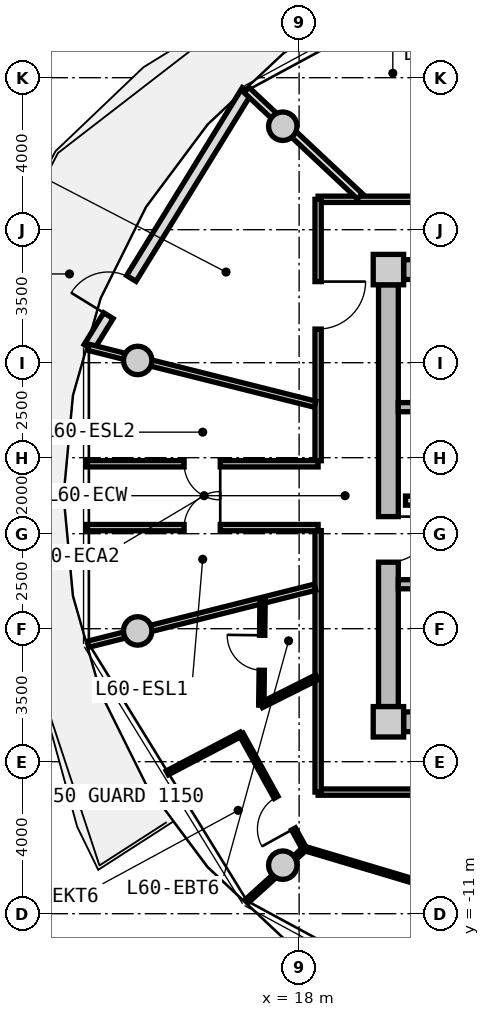
"""IFC4 building model, lengths in metres.
Left out: names, types, materials, properties, quantities, classifications, styles, units other than length and angle.
Written with IfcOpenShell. Run it as: python <this file> out.ifc"""

import sys

from ifc_helpers import new_model, si_unit, direction, frame, frame_2d, origin, origin_2d, place, context, subcontext, project, spatial, rectangle, circle, extrude, source, transform, mapped, element, fill, save


model = new_model("IFC4")
c1 = context("Model", 3, precision=1e-05, world=origin(), true_north=direction((0.0, 1.0)))
c2 = subcontext(c1, "Body", "Model", "MODEL_VIEW")
j1 = project(units=[si_unit("LENGTHUNIT", "METRE"), si_unit("PLANEANGLEUNIT", "RADIAN")], contexts=[c1])
p1 = place(None, origin())
s1 = spatial("IfcSite", under=j1, at=p1, CompositionType="ELEMENT")
p2 = place(p1, origin())
s2 = spatial("IfcBuilding", under=s1, at=p2, CompositionType="ELEMENT")
p3 = place(p2, frame((0.0, 0.0, 193.7)))
s3 = spatial("IfcBuildingStorey", under=s2, at=p3, CompositionType="ELEMENT", Elevation=193.7)
m1 = source(origin(), c2, "Body", "SweptSolid", [
    extrude(rectangle(XDim=0.8, YDim=0.8, at=origin_2d()), origin(), (0.0, 0.0, 1.0), 3.05),
])
for number, where, z_axis, x_axis in (
    (1, (20.35, -5.95, 0.0), (0.0, 0.0, 1.0), (1.0, 0.0, 0.0)),
    (2, (20.35, 5.95, 0.0), (0.0, 0.0, 1.0), (1.0, 0.0, 0.0)),
):
    element("IfcColumn", number, at=place(p3, frame(where, z_axis=z_axis, x_axis=x_axis)), inside=s3, PredefinedType="COLUMN", context=c2, shape_type="MappedRepresentation", body=[
        mapped(m1, transform((0.0, 0.0, 0.0), x_axis=(1.0, 0.0, 0.0), y_axis=(0.0, 1.0, 0.0), z_axis=(0.0, 0.0, 1.0), scale=1.0)),
    ])
m2 = source(origin(), c2, "Body", "SweptSolid", [
    extrude(rectangle(XDim=14.5, YDim=0.52, at=frame_2d((7.25, 0.0))), origin(), (0.0, 0.0, 1.0), 2.81),
])
for number, where, z_axis, x_axis in (
    (3, (20.75, 5.95, 0.0), (0.0, 0.0, 1.0), (1.0, 0.0, 0.0)),
    (4, (35.25, -5.95, 0.0), (0.0, 0.0, 1.0), (-1.0, 0.0, 0.0)),
):
    element("IfcWall", number, at=place(p3, frame(where, z_axis=z_axis, x_axis=x_axis)), inside=s3, PredefinedType="SHEAR", context=c2, shape_type="MappedRepresentation", body=[
        mapped(m2, transform((0.0, 0.0, 0.0), x_axis=(1.0, 0.0, 0.0), y_axis=(0.0, 1.0, 0.0), z_axis=(0.0, 0.0, 1.0), scale=1.0)),
    ])
m3 = source(origin(), c2, "Body", "SweptSolid", [
    extrude(rectangle(XDim=11.1, YDim=0.52, at=frame_2d((5.55, 0.0))), origin(), (0.0, 0.0, 1.0), 2.81),
])
p4 = place(p3, frame((20.35, -5.55, 0.0), z_axis=(0.0, 0.0, 1.0), x_axis=(0.0, 1.0, 0.0)))
e5 = element("IfcWall", 5, at=p4, inside=s3, PredefinedType="SHEAR", context=c2, shape_type="MappedRepresentation", body=[
    mapped(m3, transform((0.0, 0.0, 0.0), x_axis=(1.0, 0.0, 0.0), y_axis=(0.0, 1.0, 0.0), z_axis=(0.0, 0.0, 1.0), scale=1.0)),
])
p5 = place(p4, frame((3.8, 0.0, 0.0)))
e6 = element("IfcOpeningElement", 6, at=p5, cuts=e5, PredefinedType="OPENING", context=c2, shape_type="SweptSolid", body=[
    extrude(rectangle(XDim=1.2, YDim=2.15, at=frame_2d((0.6, 1.075))), frame((0.0, 0.27, 0.0), z_axis=(0.0, -1.0, 0.0), x_axis=(1.0, 0.0, 0.0)), (0.0, 0.0, 1.0), 0.54),
])
m4 = source(origin(), c2, "Body", "SweptSolid", [
    extrude(circle(Radius=0.375, at=origin_2d()), origin(), (0.0, 0.0, 1.0), 3.05),
])
for number, where, z_axis, x_axis in (
    (7, (17.57, 9.723, 0.0), (0.0, 0.0, 1.0), (1.0, 0.0, 0.0)),
    (8, (13.753, 3.559, 0.0), (0.0, 0.0, 1.0), (1.0, 0.0, 0.0)),
    (9, (13.753, -3.559, 0.0), (0.0, 0.0, 1.0), (1.0, 0.0, 0.0)),
    (10, (17.57, -9.723, 0.0), (0.0, 0.0, 1.0), (1.0, 0.0, 0.0)),
):
    element("IfcColumn", number, at=place(p3, frame(where, z_axis=z_axis, x_axis=x_axis)), inside=s3, PredefinedType="COLUMN", context=c2, shape_type="MappedRepresentation", body=[
        mapped(m4, transform((0.0, 0.0, 0.0), x_axis=(1.0, 0.0, 0.0), y_axis=(0.0, 1.0, 0.0), z_axis=(0.0, 0.0, 1.0), scale=1.0)),
    ])
m5 = source(origin(), c2, "Body", "SweptSolid", [
    extrude(rectangle(XDim=7.938, YDim=0.29, at=frame_2d((3.969, 0.0))), origin(), (0.0, 0.0, 1.0), 2.81),
])
p6 = place(p3, frame((12.468, 3.903, 0.0), z_axis=(0.0, 0.0, 1.0), x_axis=(0.524244987663, 0.851567491694, 0.0)))
e11 = element("IfcWall", 11, at=p6, inside=s3, PredefinedType="SOLIDWALL", context=c2, shape_type="MappedRepresentation", body=[
    mapped(m5, transform((0.0, 0.0, 0.0), x_axis=(1.0, 0.0, 0.0), y_axis=(0.0, 1.0, 0.0), z_axis=(0.0, 0.0, 1.0), scale=1.0)),
])
p7 = place(p6, frame((0.98, 0.0, 0.0)))
e12 = element("IfcOpeningElement", 12, at=p7, cuts=e11, PredefinedType="OPENING", context=c2, shape_type="SweptSolid", body=[
    extrude(rectangle(XDim=1.15, YDim=2.25, at=frame_2d((0.575, 1.125))), frame((0.0, 0.155, 0.0), z_axis=(0.0, -1.0, 0.0), x_axis=(1.0, 0.0, 0.0)), (0.0, 0.0, 1.0), 0.31),
])
m6 = source(origin(), c2, "Body", "SweptSolid", [
    extrude(rectangle(XDim=7.93, YDim=0.24, at=frame_2d((3.965, 0.0))), origin(), (0.0, 0.0, 1.0), 2.81),
])
p8 = place(p3, frame((20.61, 2.33, 0.0), z_axis=(0.0, 0.0, 1.0), x_axis=(1.0, 0.0, 0.0)))
e13 = element("IfcWall", 13, at=p8, inside=s3, PredefinedType="PARTITIONING", context=c2, shape_type="MappedRepresentation", body=[
    mapped(m6, transform((0.0, 0.0, 0.0), x_axis=(1.0, 0.0, 0.0), y_axis=(0.0, 1.0, 0.0), z_axis=(0.0, 0.0, 1.0), scale=1.0)),
])
p9 = place(p3, frame((20.61, -2.33, 0.0), z_axis=(0.0, 0.0, 1.0), x_axis=(1.0, 0.0, 0.0)))
e14 = element("IfcWall", 14, at=p9, inside=s3, PredefinedType="PARTITIONING", context=c2, shape_type="MappedRepresentation", body=[
    mapped(m6, transform((0.0, 0.0, 0.0), x_axis=(1.0, 0.0, 0.0), y_axis=(0.0, 1.0, 0.0), z_axis=(0.0, 0.0, 1.0), scale=1.0)),
])
p10 = place(p9, frame((1.05, 0.0, 0.0)))
e15 = element("IfcOpeningElement", 15, at=p10, cuts=e14, PredefinedType="OPENING", context=c2, shape_type="SweptSolid", body=[
    extrude(rectangle(XDim=1.1, YDim=2.15, at=frame_2d((0.55, 1.075))), frame((0.0, 0.13, 0.0), z_axis=(0.0, -1.0, 0.0), x_axis=(1.0, 0.0, 0.0)), (0.0, 0.0, 1.0), 0.26),
])
m7 = source(origin(), c2, "Body", "SweptSolid", [
    extrude(rectangle(XDim=7.62, YDim=0.24, at=frame_2d((3.81, 0.0))), origin(), (0.0, 0.0, 1.0), 2.795),
])
p11 = place(p3, frame((20.8, -0.13, 0.0), z_axis=(0.0, 0.0, 1.0), x_axis=(1.0, 0.0, 0.0)))
e16 = element("IfcWall", 16, at=p11, inside=s3, PredefinedType="PARTITIONING", context=c2, shape_type="MappedRepresentation", body=[
    mapped(m7, transform((0.0, 0.0, 0.0), x_axis=(1.0, 0.0, 0.0), y_axis=(0.0, 1.0, 0.0), z_axis=(0.0, 0.0, 1.0), scale=1.0)),
])
p12 = place(p11, frame((6.22, 0.0, 0.0)))
e17 = element("IfcOpeningElement", 17, at=p12, cuts=e16, PredefinedType="OPENING", context=c2, shape_type="SweptSolid", body=[
    extrude(rectangle(XDim=1.0, YDim=2.1, at=frame_2d((0.5, 1.05))), frame((0.0, 0.13, 0.0), z_axis=(0.0, -1.0, 0.0), x_axis=(1.0, 0.0, 0.0)), (0.0, 0.0, 1.0), 0.26),
])
p13 = place(p11, frame((2.4, 0.0, 0.0)))
e18 = element("IfcOpeningElement", 18, at=p13, cuts=e16, PredefinedType="OPENING", context=c2, shape_type="SweptSolid", body=[
    extrude(rectangle(XDim=1.0, YDim=2.1, at=frame_2d((0.5, 1.05))), frame((0.0, 0.13, 0.0), z_axis=(0.0, -1.0, 0.0), x_axis=(1.0, 0.0, 0.0)), (0.0, 0.0, 1.0), 0.26),
])
m8 = source(origin(), c2, "Body", "SweptSolid", [
    extrude(rectangle(XDim=8.58, YDim=0.165, at=frame_2d((4.29, 0.0))), origin(), (0.0, 0.0, 1.0), 2.795),
])
p14 = place(p3, frame((18.5, 7.8, 0.0), z_axis=(0.0, 0.0, 1.0), x_axis=(1.0, 0.0, 0.0)))
e19 = element("IfcWall", 19, at=p14, inside=s3, PredefinedType="PARTITIONING", context=c2, shape_type="MappedRepresentation", body=[
    mapped(m8, transform((0.0, 0.0, 0.0), x_axis=(1.0, 0.0, 0.0), y_axis=(0.0, 1.0, 0.0), z_axis=(0.0, 0.0, 1.0), scale=1.0)),
])
p15 = place(p14, frame((2.515, 0.0, 0.0)))
e20 = element("IfcOpeningElement", 20, at=p15, cuts=e19, PredefinedType="OPENING", context=c2, shape_type="SweptSolid", body=[
    extrude(rectangle(XDim=1.05, YDim=2.15, at=frame_2d((0.525, 1.075))), frame((0.0, 0.093, 0.0), z_axis=(0.0, -1.0, 0.0), x_axis=(1.0, 0.0, 0.0)), (0.0, 0.0, 1.0), 0.185),
])
m9 = source(origin(), c2, "Body", "SweptSolid", [
    extrude(rectangle(XDim=19.0, YDim=0.165, at=frame_2d((9.5, 0.0))), origin(), (0.0, 0.0, 1.0), 2.795),
])
p16 = place(p3, frame((37.5, -7.8, 0.0), z_axis=(0.0, 0.0, 1.0), x_axis=(-1.0, 0.0, 0.0)))
e21 = element("IfcWall", 21, at=p16, inside=s3, PredefinedType="PARTITIONING", context=c2, shape_type="MappedRepresentation", body=[
    mapped(m9, transform((0.0, 0.0, 0.0), x_axis=(1.0, 0.0, 0.0), y_axis=(0.0, 1.0, 0.0), z_axis=(0.0, 0.0, 1.0), scale=1.0)),
])
p17 = place(p16, frame((9.392, 0.0, 0.0)))
e22 = element("IfcOpeningElement", 22, at=p17, cuts=e21, PredefinedType="OPENING", context=c2, shape_type="SweptSolid", body=[
    extrude(rectangle(XDim=1.05, YDim=2.15, at=frame_2d((0.525, 1.075))), frame((0.0, 0.093, 0.0), z_axis=(0.0, -1.0, 0.0), x_axis=(1.0, 0.0, 0.0)), (0.0, 0.0, 1.0), 0.185),
])
m10 = source(origin(), c2, "Body", "SweptSolid", [
    extrude(rectangle(XDim=6.88, YDim=0.165, at=frame_2d((3.44, 0.0))), origin(), (0.0, 0.0, 1.0), 2.795),
])
p18 = place(p3, frame((18.5, -7.8, 0.0), z_axis=(0.0, 0.0, 1.0), x_axis=(0.0, 1.0, 0.0)))
e23 = element("IfcWall", 23, at=p18, inside=s3, PredefinedType="PARTITIONING", context=c2, shape_type="MappedRepresentation", body=[
    mapped(m10, transform((0.0, 0.0, 0.0), x_axis=(1.0, 0.0, 0.0), y_axis=(0.0, 1.0, 0.0), z_axis=(0.0, 0.0, 1.0), scale=1.0)),
])
p19 = place(p3, frame((18.5, 0.92, 0.0), z_axis=(0.0, 0.0, 1.0), x_axis=(0.0, 1.0, 0.0)))
e24 = element("IfcWall", 24, at=p19, inside=s3, PredefinedType="PARTITIONING", context=c2, shape_type="MappedRepresentation", body=[
    mapped(m10, transform((0.0, 0.0, 0.0), x_axis=(1.0, 0.0, 0.0), y_axis=(0.0, 1.0, 0.0), z_axis=(0.0, 0.0, 1.0), scale=1.0)),
])
p20 = place(p19, frame((3.464, 0.0, 0.0)))
e25 = element("IfcOpeningElement", 25, at=p20, cuts=e24, PredefinedType="OPENING", context=c2, shape_type="SweptSolid", body=[
    extrude(rectangle(XDim=1.25, YDim=2.2, at=frame_2d((0.625, 1.1))), frame((0.0, 0.093, 0.0), z_axis=(0.0, -1.0, 0.0), x_axis=(1.0, 0.0, 0.0)), (0.0, 0.0, 1.0), 0.185),
])
m11 = source(origin(), c2, "Body", "SweptSolid", [
    extrude(rectangle(XDim=6.157, YDim=0.165, at=frame_2d((3.079, 0.0))), origin(), (0.0, 0.0, 1.0), 2.395),
])
for number, where, z_axis, x_axis in (
    (26, (18.42, 2.407, 0.0), (0.0, 0.0, 1.0), (-0.97, 0.244, 0.0)),
    (27, (18.42, -2.407, 0.0), (0.0, 0.0, 1.0), (-0.97, -0.244, 0.0)),
):
    element("IfcWall", number, at=place(p3, frame(where, z_axis=z_axis, x_axis=x_axis)), inside=s3, PredefinedType="PARTITIONING", context=c2, shape_type="MappedRepresentation", body=[
        mapped(m11, transform((0.0, 0.0, 0.0), x_axis=(1.0, 0.0, 0.0), y_axis=(0.0, 1.0, 0.0), z_axis=(0.0, 0.0, 1.0), scale=1.0)),
    ])
m12 = source(origin(), c2, "Body", "SweptSolid", [
    extrude(rectangle(XDim=6.101, YDim=0.165, at=frame_2d((3.051, 0.0))), origin(), (0.0, 0.0, 1.0), 2.795),
])
p21 = place(p3, frame((12.399, 0.84, 0.0), z_axis=(0.0, 0.0, 1.0), x_axis=(1.0, 0.0, 0.0)))
e28 = element("IfcWall", 28, at=p21, inside=s3, PredefinedType="PARTITIONING", context=c2, shape_type="MappedRepresentation", body=[
    mapped(m12, transform((0.0, 0.0, 0.0), x_axis=(1.0, 0.0, 0.0), y_axis=(0.0, 1.0, 0.0), z_axis=(0.0, 0.0, 1.0), scale=1.0)),
])
p22 = place(p21, frame((2.576, 0.0, 0.0)))
e29 = element("IfcOpeningElement", 29, at=p22, cuts=e28, PredefinedType="OPENING", context=c2, shape_type="SweptSolid", body=[
    extrude(rectangle(XDim=0.95, YDim=2.1, at=frame_2d((0.475, 1.05))), frame((0.0, 0.093, 0.0), z_axis=(0.0, -1.0, 0.0), x_axis=(1.0, 0.0, 0.0)), (0.0, 0.0, 1.0), 0.185),
])
p23 = place(p3, frame((18.5, -0.84, 0.0), z_axis=(0.0, 0.0, 1.0), x_axis=(-1.0, 0.0, 0.0)))
e30 = element("IfcWall", 30, at=p23, inside=s3, PredefinedType="PARTITIONING", context=c2, shape_type="MappedRepresentation", body=[
    mapped(m12, transform((0.0, 0.0, 0.0), x_axis=(1.0, 0.0, 0.0), y_axis=(0.0, 1.0, 0.0), z_axis=(0.0, 0.0, 1.0), scale=1.0)),
])
p24 = place(p23, frame((2.576, 0.0, 0.0)))
e31 = element("IfcOpeningElement", 31, at=p24, cuts=e30, PredefinedType="OPENING", context=c2, shape_type="SweptSolid", body=[
    extrude(rectangle(XDim=0.95, YDim=2.1, at=frame_2d((0.475, 1.05))), frame((0.0, 0.093, 0.0), z_axis=(0.0, -1.0, 0.0), x_axis=(1.0, 0.0, 0.0)), (0.0, 0.0, 1.0), 0.185),
])
m13 = source(origin(), c2, "Body", "SweptSolid", [
    extrude(rectangle(XDim=4.089, YDim=0.19, at=frame_2d((2.044, 0.0))), origin(), (0.0, 0.0, 1.0), 2.435),
])
p25 = place(p3, frame((19.598, 7.88, 0.0), z_axis=(0.0, 0.0, 1.0), x_axis=(-0.729401273609, 0.684086092577, 0.0)))
e32 = element("IfcWall", 32, at=p25, inside=s3, PredefinedType="PARTITIONING", context=c2, shape_type="MappedRepresentation", body=[
    mapped(m13, transform((0.0, 0.0, 0.0), x_axis=(1.0, 0.0, 0.0), y_axis=(0.0, 1.0, 0.0), z_axis=(0.0, 0.0, 1.0), scale=1.0)),
])
m14 = source(origin(), c2, "Body", "SweptSolid", [
    extrude(rectangle(XDim=6.936, YDim=0.115, at=frame_2d((3.468, 0.0))), origin(), (0.0, 0.0, 1.0), 2.795),
])
p26 = place(p3, frame((18.151, -9.287, 0.0), z_axis=(0.0, 0.0, 1.0), x_axis=(0.958186895835, -0.286143098205, 0.0)))
e33 = element("IfcWall", 33, at=p26, inside=s3, PredefinedType="PARTITIONING", context=c2, shape_type="MappedRepresentation", body=[
    mapped(m14, transform((0.0, 0.0, 0.0), x_axis=(1.0, 0.0, 0.0), y_axis=(0.0, 1.0, 0.0), z_axis=(0.0, 0.0, 1.0), scale=1.0)),
])
p27 = place(p26, frame((2.993, 0.0, 0.0)))
e34 = element("IfcOpeningElement", 34, at=p27, cuts=e33, PredefinedType="OPENING", context=c2, shape_type="SweptSolid", body=[
    extrude(rectangle(XDim=0.95, YDim=2.1, at=frame_2d((0.475, 1.05))), frame((0.0, 0.067, 0.0), z_axis=(0.0, -1.0, 0.0), x_axis=(1.0, 0.0, 0.0)), (0.0, 0.0, 1.0), 0.135),
])
m15 = source(origin(), c2, "Body", "SweptSolid", [
    extrude(rectangle(XDim=2.072, YDim=0.115, at=frame_2d((1.036, 0.0))), origin(), (0.0, 0.0, 1.0), 2.395),
])
p28 = place(p3, frame((18.151, -9.287, 0.0), z_axis=(0.0, 0.0, 1.0), x_axis=(-0.741410125356, -0.671052178314, 0.0)))
e35 = element("IfcWall", 35, at=p28, inside=s3, PredefinedType="PARTITIONING", context=c2, shape_type="MappedRepresentation", body=[
    mapped(m15, transform((0.0, 0.0, 0.0), x_axis=(1.0, 0.0, 0.0), y_axis=(0.0, 1.0, 0.0), z_axis=(0.0, 0.0, 1.0), scale=1.0)),
])
m16 = source(origin(), c2, "Body", "SweptSolid", [
    extrude(rectangle(XDim=1.638, YDim=0.14, at=frame_2d((0.819, 0.0))), origin(), (0.0, 0.0, 1.0), 2.795),
])
p29 = place(p3, frame((18.47, -4.778, 0.0), z_axis=(0.0, 0.0, 1.0), x_axis=(-0.893919977945, -0.448226586707, 0.0)))
e36 = element("IfcWall", 36, at=p29, inside=s3, PredefinedType="PARTITIONING", context=c2, shape_type="MappedRepresentation", body=[
    mapped(m16, transform((0.0, 0.0, 0.0), x_axis=(1.0, 0.0, 0.0), y_axis=(0.0, 1.0, 0.0), z_axis=(0.0, 0.0, 1.0), scale=1.0)),
])
m17 = source(origin(), c2, "Body", "SweptSolid", [
    extrude(rectangle(XDim=2.759, YDim=0.14, at=frame_2d((1.379, 0.0))), origin(), (0.0, 0.0, 1.0), 2.795),
])
p30 = place(p3, frame((17.005, -5.513, 0.0), z_axis=(0.0, 0.0, 1.0), x_axis=(0.01194710728, 0.999928630767, 0.0)))
e37 = element("IfcWall", 37, at=p30, inside=s3, PredefinedType="PARTITIONING", context=c2, shape_type="MappedRepresentation", body=[
    mapped(m17, transform((0.0, 0.0, 0.0), x_axis=(1.0, 0.0, 0.0), y_axis=(0.0, 1.0, 0.0), z_axis=(0.0, 0.0, 1.0), scale=1.0)),
])
p31 = place(p30, frame((0.919, 0.0, 0.0)))
e38 = element("IfcOpeningElement", 38, at=p31, cuts=e37, PredefinedType="OPENING", context=c2, shape_type="SweptSolid", body=[
    extrude(rectangle(XDim=0.92, YDim=2.1, at=frame_2d((0.46, 1.05))), frame((0.0, 0.08, 0.0), z_axis=(0.0, -1.0, 0.0), x_axis=(1.0, 0.0, 0.0)), (0.0, 0.0, 1.0), 0.16),
])
m18 = source(origin(), c2, "Body", "SweptSolid", [
    extrude(rectangle(XDim=2.193, YDim=0.115, at=frame_2d((1.097, 0.0))), origin(), (0.0, 0.0, 1.0), 2.795),
])
p32 = place(p3, frame((16.475, -6.275, 0.0), z_axis=(0.0, 0.0, 1.0), x_axis=(-0.885783595046, -0.464098505435, 0.0)))
e39 = element("IfcWall", 39, at=p32, inside=s3, PredefinedType="PARTITIONING", context=c2, shape_type="MappedRepresentation", body=[
    mapped(m18, transform((0.0, 0.0, 0.0), x_axis=(1.0, 0.0, 0.0), y_axis=(0.0, 1.0, 0.0), z_axis=(0.0, 0.0, 1.0), scale=1.0)),
])
m19 = source(origin(), c2, "Body", "SweptSolid", [
    extrude(rectangle(XDim=3.45, YDim=0.115, at=frame_2d((1.725, 0.0))), origin(), (0.0, 0.0, 1.0), 2.795),
])
p33 = place(p3, frame((16.475, -6.275, 0.0), z_axis=(0.0, 0.0, 1.0), x_axis=(0.483659007882, -0.875256513312, 0.0)))
e40 = element("IfcWall", 40, at=p33, inside=s3, PredefinedType="PARTITIONING", context=c2, shape_type="MappedRepresentation", body=[
    mapped(m19, transform((0.0, 0.0, 0.0), x_axis=(1.0, 0.0, 0.0), y_axis=(0.0, 1.0, 0.0), z_axis=(0.0, 0.0, 1.0), scale=1.0)),
])
p34 = place(p33, frame((1.9, 0.0, 0.0)))
e41 = element("IfcOpeningElement", 41, at=p34, cuts=e40, PredefinedType="OPENING", context=c2, shape_type="SweptSolid", body=[
    extrude(rectangle(XDim=0.95, YDim=2.1, at=frame_2d((0.475, 1.05))), frame((0.0, 0.067, 0.0), z_axis=(0.0, -1.0, 0.0), x_axis=(1.0, 0.0, 0.0)), (0.0, 0.0, 1.0), 0.135),
])
m20 = source(origin(), c2, "Body", "SweptSolid", [
    extrude(rectangle(XDim=1.15, YDim=2.25, at=frame_2d((0.575, 1.125))), frame((0.0, 0.025, 0.0), z_axis=(0.0, -1.0, 0.0), x_axis=(1.0, 0.0, 0.0)), (0.0, 0.0, 1.0), 0.05),
])
p35 = place(p7, origin())
e42 = element("IfcDoor", 42, at=p35, inside=s3, OperationType="SINGLE_SWING_LEFT", PredefinedType="DOOR", context=c2, shape_type="MappedRepresentation", body=[
    mapped(m20, transform((0.0, 0.0, 0.0), x_axis=(1.0, 0.0, 0.0), y_axis=(0.0, 1.0, 0.0), z_axis=(0.0, 0.0, 1.0), scale=1.0)),
])
fill(e12, e42)
m21 = source(origin(), c2, "Body", "SweptSolid", [
    extrude(rectangle(XDim=1.2, YDim=2.15, at=frame_2d((0.6, 1.075))), frame((0.0, 0.025, 0.0), z_axis=(0.0, -1.0, 0.0), x_axis=(1.0, 0.0, 0.0)), (0.0, 0.0, 1.0), 0.05),
])
p36 = place(p5, frame((1.2, 0.0, 0.0), z_axis=(0.0, 0.0, 1.0), x_axis=(-1.0, 0.0, 0.0)))
e43 = element("IfcDoor", 43, at=p36, inside=s3, OperationType="SINGLE_SWING_LEFT", PredefinedType="DOOR", context=c2, shape_type="MappedRepresentation", body=[
    mapped(m21, transform((0.0, 0.0, 0.0), x_axis=(1.0, 0.0, 0.0), y_axis=(0.0, 1.0, 0.0), z_axis=(0.0, 0.0, 1.0), scale=1.0)),
])
fill(e6, e43)
m22 = source(origin(), c2, "Body", "SweptSolid", [
    extrude(rectangle(XDim=0.95, YDim=2.1, at=frame_2d((0.475, 1.05))), frame((0.0, 0.025, 0.0), z_axis=(0.0, -1.0, 0.0), x_axis=(1.0, 0.0, 0.0)), (0.0, 0.0, 1.0), 0.05),
])
p37 = place(p24, frame((0.95, 0.0, 0.0), z_axis=(0.0, 0.0, 1.0), x_axis=(-1.0, 0.0, 0.0)))
e44 = element("IfcDoor", 44, at=p37, inside=s3, OperationType="SINGLE_SWING_RIGHT", PredefinedType="DOOR", context=c2, shape_type="MappedRepresentation", body=[
    mapped(m22, transform((0.0, 0.0, 0.0), x_axis=(1.0, 0.0, 0.0), y_axis=(0.0, 1.0, 0.0), z_axis=(0.0, 0.0, 1.0), scale=1.0)),
])
fill(e31, e44)
p38 = place(p22, frame((0.95, 0.0, 0.0), z_axis=(0.0, 0.0, 1.0), x_axis=(-1.0, 0.0, 0.0)))
e45 = element("IfcDoor", 45, at=p38, inside=s3, OperationType="SINGLE_SWING_LEFT", PredefinedType="DOOR", context=c2, shape_type="MappedRepresentation", body=[
    mapped(m22, transform((0.0, 0.0, 0.0), x_axis=(1.0, 0.0, 0.0), y_axis=(0.0, 1.0, 0.0), z_axis=(0.0, 0.0, 1.0), scale=1.0)),
])
fill(e29, e45)
m23 = source(origin(), c2, "Body", "SweptSolid", [
    extrude(rectangle(XDim=1.25, YDim=2.2, at=frame_2d((0.625, 1.1))), frame((0.0, 0.025, 0.0), z_axis=(0.0, -1.0, 0.0), x_axis=(1.0, 0.0, 0.0)), (0.0, 0.0, 1.0), 0.05),
])
p39 = place(p20, frame((1.25, 0.0, 0.0), z_axis=(0.0, 0.0, 1.0), x_axis=(-1.0, 0.0, 0.0)))
e46 = element("IfcDoor", 46, at=p39, inside=s3, OperationType="SINGLE_SWING_LEFT", PredefinedType="DOOR", context=c2, shape_type="MappedRepresentation", body=[
    mapped(m23, transform((0.0, 0.0, 0.0), x_axis=(1.0, 0.0, 0.0), y_axis=(0.0, 1.0, 0.0), z_axis=(0.0, 0.0, 1.0), scale=1.0)),
])
fill(e25, e46)
m24 = source(origin(), c2, "Body", "SweptSolid", [
    extrude(rectangle(XDim=0.92, YDim=2.1, at=frame_2d((0.46, 1.05))), frame((0.0, 0.025, 0.0), z_axis=(0.0, -1.0, 0.0), x_axis=(1.0, 0.0, 0.0)), (0.0, 0.0, 1.0), 0.05),
])
p40 = place(p31, origin())
e47 = element("IfcDoor", 47, at=p40, inside=s3, OperationType="SINGLE_SWING_RIGHT", PredefinedType="DOOR", context=c2, shape_type="MappedRepresentation", body=[
    mapped(m24, transform((0.0, 0.0, 0.0), x_axis=(1.0, 0.0, 0.0), y_axis=(0.0, 1.0, 0.0), z_axis=(0.0, 0.0, 1.0), scale=1.0)),
])
fill(e38, e47)
p41 = place(p34, frame((0.95, 0.0, 0.0), z_axis=(0.0, 0.0, 1.0), x_axis=(-1.0, 0.0, 0.0)))
e48 = element("IfcDoor", 48, at=p41, inside=s3, OperationType="SINGLE_SWING_LEFT", PredefinedType="DOOR", context=c2, shape_type="MappedRepresentation", body=[
    mapped(m22, transform((0.0, 0.0, 0.0), x_axis=(1.0, 0.0, 0.0), y_axis=(0.0, 1.0, 0.0), z_axis=(0.0, 0.0, 1.0), scale=1.0)),
])
fill(e41, e48)
save(model, sys.argv[1])
